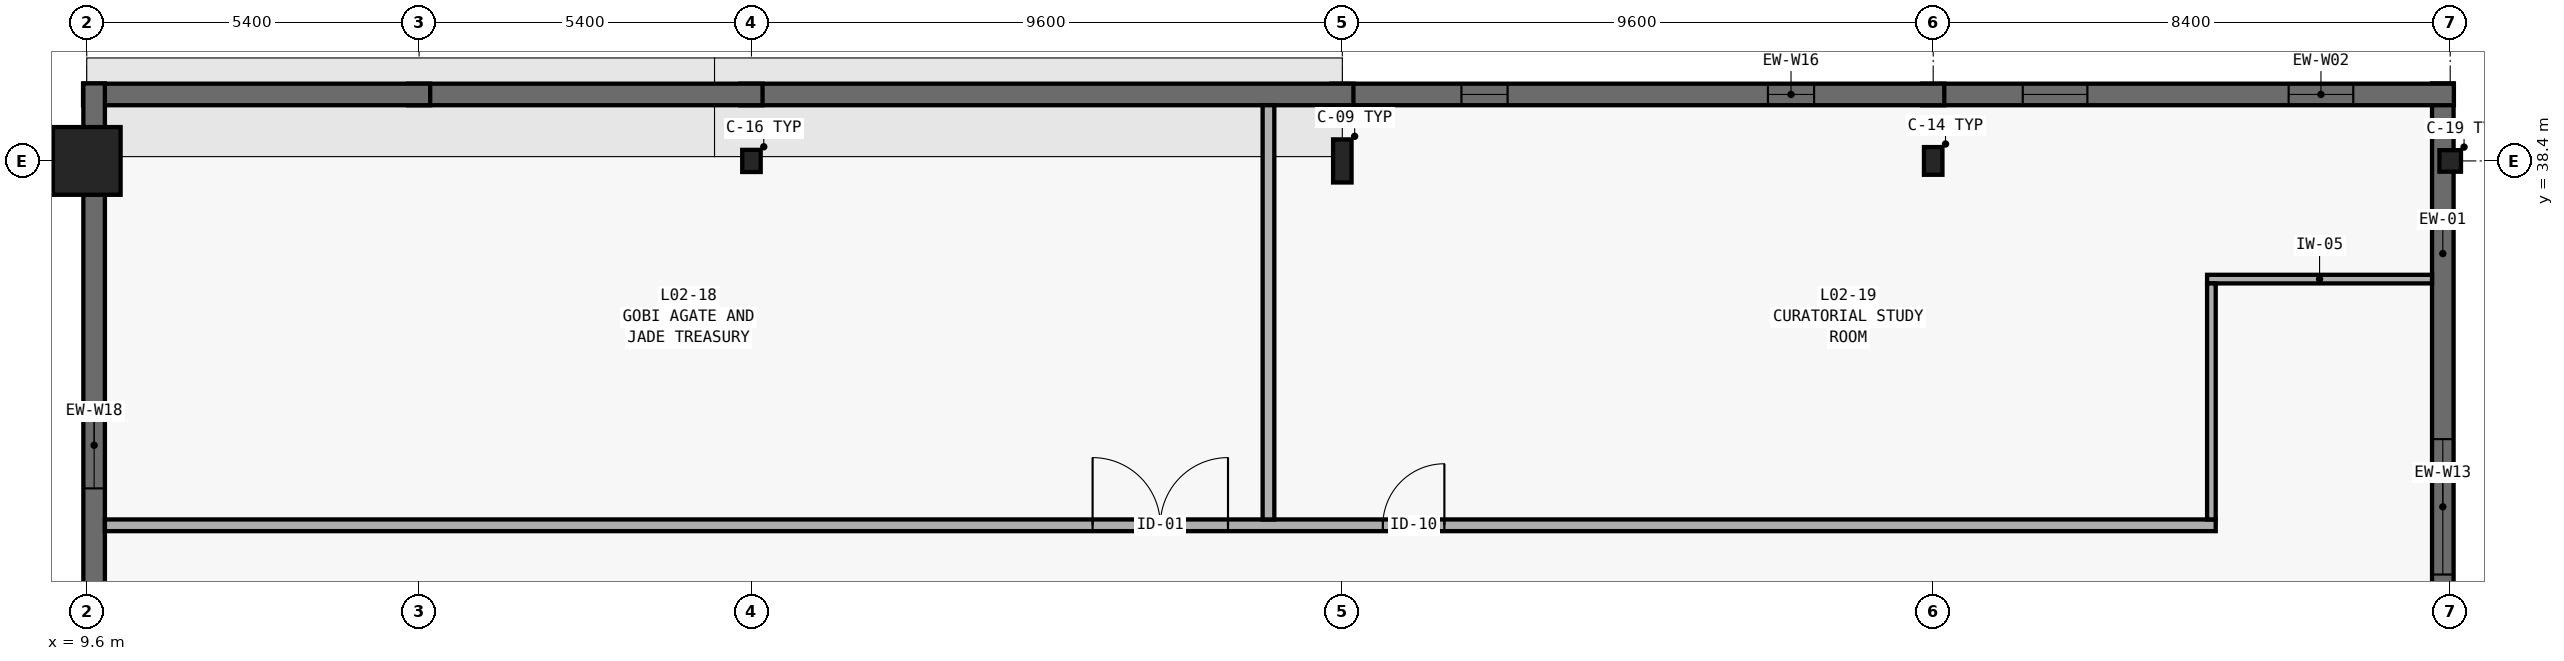
"""IFC4 building model, lengths in metres.
Left out: names, types, materials, properties, quantities, classifications, styles, units other than length and angle.
Written with IfcOpenShell. Run it as: python <this file> out.ifc"""

import sys

from ifc_helpers import new_model, si_unit, direction, frame, frame_2d, origin, origin_2d, place, context, subcontext, project, spatial, rectangle, hollow_rectangle, i_section, extrude, element, fill, save


model = new_model("IFC4")
c1 = context("Model", 3, precision=1e-05, world=origin(), true_north=direction((0.0, 1.0)))
c2 = subcontext(c1, "Body", "Model", "MODEL_VIEW")
j1 = project(units=[si_unit("LENGTHUNIT", "METRE"), si_unit("PLANEANGLEUNIT", "RADIAN")], contexts=[c1])
p1 = place(None, origin())
s1 = spatial("IfcSite", under=j1, at=p1, CompositionType="ELEMENT")
p2 = place(p1, origin())
s2 = spatial("IfcBuilding", under=s1, at=p2, CompositionType="ELEMENT")
p3 = place(p2, frame((0.0, 0.0, 9.0)))
s3 = spatial("IfcBuildingStorey", under=s2, at=p3, CompositionType="ELEMENT", Elevation=9.0)
p4 = place(p3, frame((9.6, 38.4, 0.0), z_axis=(0.0, 0.0, 1.0), x_axis=(1.0, 0.0, 0.0)))
e1 = element("IfcColumn", 1, at=p4, inside=s3, PredefinedType="COLUMN", context=c2, shape_type="SweptSolid", body=[
    extrude(rectangle(XDim=1.1, YDim=1.1, at=origin_2d()), origin(), (0.0, 0.0, 1.0), 8.1),
])
p5 = place(p3, frame((20.4, 38.4, 0.0), z_axis=(0.0, 0.0, 1.0), x_axis=(1.0, 0.0, 0.0)))
e2 = element("IfcColumn", 2, at=p5, inside=s3, PredefinedType="COLUMN", context=c2, shape_type="SweptSolid", body=[
    extrude(i_section(OverallWidth=0.3, OverallDepth=0.36, WebThickness=0.012, FlangeThickness=0.022, FilletRadius=0.027, at=origin_2d()), origin(), (0.0, 0.0, 1.0), 8.1),
])
p6 = place(p3, frame((30.0, 38.4, 0.0), z_axis=(0.0, 0.0, 1.0), x_axis=(1.0, 0.0, 0.0)))
e3 = element("IfcColumn", 3, at=p6, inside=s3, PredefinedType="COLUMN", context=c2, shape_type="SweptSolid", body=[
    extrude(i_section(OverallWidth=0.3, OverallDepth=0.7, WebThickness=0.017, FlangeThickness=0.032, FilletRadius=0.027, at=origin_2d()), origin(), (0.0, 0.0, 1.0), 8.1),
])
p7 = place(p3, frame((39.6, 38.4, 0.0), z_axis=(0.0, 0.0, 1.0), x_axis=(1.0, 0.0, 0.0)))
e4 = element("IfcColumn", 4, at=p7, inside=s3, PredefinedType="COLUMN", context=c2, shape_type="SweptSolid", body=[
    extrude(i_section(OverallWidth=0.3, OverallDepth=0.45, WebThickness=0.014, FlangeThickness=0.026, FilletRadius=0.027, at=origin_2d()), origin(), (0.0, 0.0, 1.0), 8.1),
])
p8 = place(p3, frame((48.0, 38.4, 0.0), z_axis=(0.0, 0.0, 1.0), x_axis=(1.0, 0.0, 0.0)))
e5 = element("IfcColumn", 5, at=p8, inside=s3, PredefinedType="COLUMN", context=c2, shape_type="SweptSolid", body=[
    extrude(hollow_rectangle(XDim=0.35, YDim=0.35, WallThickness=0.016, at=origin_2d()), origin(), (0.0, 0.0, 1.0), 8.1),
])
p9 = place(p3, frame((47.88, 29.82, 0.0), z_axis=(0.0, 0.0, 1.0), x_axis=(0.0, 1.0, 0.0)))
e6 = element("IfcWall", 6, at=p9, inside=s3, PredefinedType="STANDARD", context=c2, shape_type="SweptSolid", body=[
    extrude(rectangle(XDim=9.84, YDim=0.35, at=frame_2d((4.92, 0.0))), origin(), (0.0, 0.0, 1.0), 7.8),
])
p10 = place(p9, frame((1.86, 0.0, 0.9)))
e7 = element("IfcOpeningElement", 7, at=p10, cuts=e6, PredefinedType="OPENING", context=c2, shape_type="SweptSolid", body=[
    extrude(rectangle(XDim=2.2, YDim=1.1, at=frame_2d((1.1, 0.55))), frame((0.0, 0.19, 0.0), z_axis=(0.0, -1.0, 0.0), x_axis=(1.0, 0.0, 0.0)), (0.0, 0.0, 1.0), 0.38),
])
p11 = place(p3, frame((48.06, 39.48, 0.0), z_axis=(0.0, 0.0, 1.0), x_axis=(-1.0, 0.0, 0.0)))
e8 = element("IfcWall", 8, at=p11, inside=s3, PredefinedType="STANDARD", context=c2, shape_type="SweptSolid", body=[
    extrude(rectangle(XDim=8.64, YDim=0.35, at=frame_2d((4.32, 0.0))), origin(), (0.0, 0.0, 1.0), 7.8),
])
p12 = place(p11, frame((1.635, 0.0, 0.9)))
e9 = element("IfcOpeningElement", 9, at=p12, cuts=e8, PredefinedType="OPENING", context=c2, shape_type="SweptSolid", body=[
    extrude(rectangle(XDim=1.05, YDim=2.4, at=frame_2d((0.525, 1.2))), frame((0.0, 0.19, 0.0), z_axis=(0.0, -1.0, 0.0), x_axis=(1.0, 0.0, 0.0)), (0.0, 0.0, 1.0), 0.38),
])
p13 = place(p11, frame((5.955, 0.0, 0.9)))
e10 = element("IfcOpeningElement", 10, at=p13, cuts=e8, PredefinedType="OPENING", context=c2, shape_type="SweptSolid", body=[
    extrude(rectangle(XDim=1.05, YDim=2.4, at=frame_2d((0.525, 1.2))), frame((0.0, 0.19, 0.0), z_axis=(0.0, -1.0, 0.0), x_axis=(1.0, 0.0, 0.0)), (0.0, 0.0, 1.0), 0.38),
])
p14 = place(p3, frame((39.78, 39.48, 0.0), z_axis=(0.0, 0.0, 1.0), x_axis=(-1.0, 0.0, 0.0)))
e11 = element("IfcWall", 11, at=p14, inside=s3, PredefinedType="STANDARD", context=c2, shape_type="SweptSolid", body=[
    extrude(rectangle(XDim=9.96, YDim=0.35, at=frame_2d((4.98, 0.0))), origin(), (0.0, 0.0, 1.0), 7.8),
])
p15 = place(p14, frame((2.115, 0.0, 0.9)))
e12 = element("IfcOpeningElement", 12, at=p15, cuts=e11, PredefinedType="OPENING", context=c2, shape_type="SweptSolid", body=[
    extrude(rectangle(XDim=0.75, YDim=2.2, at=frame_2d((0.375, 1.1))), frame((0.0, 0.19, 0.0), z_axis=(0.0, -1.0, 0.0), x_axis=(1.0, 0.0, 0.0)), (0.0, 0.0, 1.0), 0.38),
])
p16 = place(p14, frame((7.095, 0.0, 0.9)))
e13 = element("IfcOpeningElement", 13, at=p16, cuts=e11, PredefinedType="OPENING", context=c2, shape_type="SweptSolid", body=[
    extrude(rectangle(XDim=0.75, YDim=2.2, at=frame_2d((0.375, 1.1))), frame((0.0, 0.19, 0.0), z_axis=(0.0, -1.0, 0.0), x_axis=(1.0, 0.0, 0.0)), (0.0, 0.0, 1.0), 0.38),
])
p17 = place(p3, frame((30.18, 39.48, 0.0), z_axis=(0.0, 0.0, 1.0), x_axis=(-1.0, 0.0, 0.0)))
e14 = element("IfcWall", 14, at=p17, inside=s3, PredefinedType="STANDARD", context=c2, shape_type="SweptSolid", body=[
    extrude(rectangle(XDim=9.96, YDim=0.35, at=frame_2d((4.98, 0.0))), origin(), (0.0, 0.0, 1.0), 7.8),
])
p18 = place(p3, frame((20.58, 39.48, 0.0), z_axis=(0.0, 0.0, 1.0), x_axis=(-1.0, 0.0, 0.0)))
e15 = element("IfcWall", 15, at=p18, inside=s3, PredefinedType="STANDARD", context=c2, shape_type="SweptSolid", body=[
    extrude(rectangle(XDim=5.76, YDim=0.35, at=frame_2d((2.88, 0.0))), origin(), (0.0, 0.0, 1.0), 7.8),
])
p19 = place(p3, frame((15.18, 39.48, 0.0), z_axis=(0.0, 0.0, 1.0), x_axis=(-1.0, 0.0, 0.0)))
e16 = element("IfcWall", 16, at=p19, inside=s3, PredefinedType="STANDARD", context=c2, shape_type="SweptSolid", body=[
    extrude(rectangle(XDim=5.64, YDim=0.35, at=frame_2d((2.82, 0.0))), origin(), (0.0, 0.0, 1.0), 7.8),
])
p20 = place(p3, frame((9.72, 39.66, 0.0), z_axis=(0.0, 0.0, 1.0), x_axis=(0.0, -1.0, 0.0)))
e17 = element("IfcWall", 17, at=p20, inside=s3, PredefinedType="STANDARD", context=c2, shape_type="SweptSolid", body=[
    extrude(rectangle(XDim=9.84, YDim=0.35, at=frame_2d((4.92, 0.0))), origin(), (0.0, 0.0, 1.0), 7.8),
])
p21 = place(p20, frame((5.18, 0.0, 0.9)))
e18 = element("IfcOpeningElement", 18, at=p21, cuts=e17, PredefinedType="OPENING", context=c2, shape_type="SweptSolid", body=[
    extrude(rectangle(XDim=1.4, YDim=1.8, at=frame_2d((0.7, 0.9))), frame((0.0, 0.19, 0.0), z_axis=(0.0, -1.0, 0.0), x_axis=(1.0, 0.0, 0.0)), (0.0, 0.0, 1.0), 0.38),
])
p22 = place(p3, frame((9.895, 32.48, 0.0), z_axis=(0.0, 0.0, 1.0), x_axis=(1.0, 0.0, 0.0)))
e19 = element("IfcWall", 19, at=p22, inside=s3, PredefinedType="PARTITIONING", context=c2, shape_type="SweptSolid", body=[
    extrude(rectangle(XDim=34.295, YDim=0.19, at=frame_2d((17.147, 0.0))), origin(), (0.0, 0.0, 1.0), 6.7),
])
p23 = place(p22, frame((16.048, 0.0, 0.0)))
e20 = element("IfcOpeningElement", 20, at=p23, cuts=e19, PredefinedType="OPENING", context=c2, shape_type="SweptSolid", body=[
    extrude(rectangle(XDim=2.2, YDim=2.45, at=frame_2d((1.1, 1.225))), frame((0.0, 0.11, 0.0), z_axis=(0.0, -1.0, 0.0), x_axis=(1.0, 0.0, 0.0)), (0.0, 0.0, 1.0), 0.22),
])
p24 = place(p22, frame((20.763, 0.0, 0.0)))
e21 = element("IfcOpeningElement", 21, at=p24, cuts=e19, PredefinedType="OPENING", context=c2, shape_type="SweptSolid", body=[
    extrude(rectangle(XDim=1.0, YDim=2.15, at=frame_2d((0.5, 1.075))), frame((0.0, 0.11, 0.0), z_axis=(0.0, -1.0, 0.0), x_axis=(1.0, 0.0, 0.0)), (0.0, 0.0, 1.0), 0.22),
])
p25 = place(p3, frame((44.05, 36.48, 0.0), z_axis=(0.0, 0.0, 1.0), x_axis=(1.0, 0.0, 0.0)))
e22 = element("IfcWall", 22, at=p25, inside=s3, PredefinedType="PARTITIONING", context=c2, shape_type="SweptSolid", body=[
    extrude(rectangle(XDim=3.655, YDim=0.14, at=frame_2d((1.828, 0.0))), origin(), (0.0, 0.0, 1.0), 6.7),
])
p26 = place(p3, frame((28.8, 32.575, 0.0), z_axis=(0.0, 0.0, 1.0), x_axis=(0.0, 1.0, 0.0)))
e23 = element("IfcWall", 23, at=p26, inside=s3, PredefinedType="PARTITIONING", context=c2, shape_type="SweptSolid", body=[
    extrude(rectangle(XDim=6.73, YDim=0.19, at=frame_2d((3.365, 0.0))), origin(), (0.0, 0.0, 1.0), 6.7),
])
p27 = place(p3, frame((44.12, 32.575, 0.0), z_axis=(0.0, 0.0, 1.0), x_axis=(0.0, 1.0, 0.0)))
e24 = element("IfcWall", 24, at=p27, inside=s3, PredefinedType="PARTITIONING", context=c2, shape_type="SweptSolid", body=[
    extrude(rectangle(XDim=3.835, YDim=0.14, at=frame_2d((1.917, 0.0))), origin(), (0.0, 0.0, 1.0), 6.7),
])
p28 = place(p10, origin())
e25 = element("IfcWindow", 25, at=p28, inside=s3, PartitioningType="SINGLE_PANEL", PredefinedType="WINDOW", context=c2, shape_type="SweptSolid", body=[
    extrude(rectangle(XDim=2.2, YDim=1.1, at=frame_2d((1.1, 0.55))), frame((0.0, 0.03, 0.0), z_axis=(0.0, -1.0, 0.0), x_axis=(1.0, 0.0, 0.0)), (0.0, 0.0, 1.0), 0.06),
])
fill(e7, e25)
p29 = place(p12, origin())
e26 = element("IfcWindow", 26, at=p29, inside=s3, PartitioningType="SINGLE_PANEL", PredefinedType="WINDOW", context=c2, shape_type="SweptSolid", body=[
    extrude(rectangle(XDim=1.05, YDim=2.4, at=frame_2d((0.525, 1.2))), frame((0.0, 0.03, 0.0), z_axis=(0.0, -1.0, 0.0), x_axis=(1.0, 0.0, 0.0)), (0.0, 0.0, 1.0), 0.06),
])
fill(e9, e26)
p30 = place(p13, origin())
e27 = element("IfcWindow", 27, at=p30, inside=s3, PartitioningType="SINGLE_PANEL", PredefinedType="WINDOW", context=c2, shape_type="SweptSolid", body=[
    extrude(rectangle(XDim=1.05, YDim=2.4, at=frame_2d((0.525, 1.2))), frame((0.0, 0.03, 0.0), z_axis=(0.0, -1.0, 0.0), x_axis=(1.0, 0.0, 0.0)), (0.0, 0.0, 1.0), 0.06),
])
fill(e10, e27)
p31 = place(p15, origin())
e28 = element("IfcWindow", 28, at=p31, inside=s3, PartitioningType="SINGLE_PANEL", PredefinedType="WINDOW", context=c2, shape_type="SweptSolid", body=[
    extrude(rectangle(XDim=0.75, YDim=2.2, at=frame_2d((0.375, 1.1))), frame((0.0, 0.03, 0.0), z_axis=(0.0, -1.0, 0.0), x_axis=(1.0, 0.0, 0.0)), (0.0, 0.0, 1.0), 0.06),
])
fill(e12, e28)
p32 = place(p16, origin())
e29 = element("IfcWindow", 29, at=p32, inside=s3, PartitioningType="SINGLE_PANEL", PredefinedType="WINDOW", context=c2, shape_type="SweptSolid", body=[
    extrude(rectangle(XDim=0.75, YDim=2.2, at=frame_2d((0.375, 1.1))), frame((0.0, 0.03, 0.0), z_axis=(0.0, -1.0, 0.0), x_axis=(1.0, 0.0, 0.0)), (0.0, 0.0, 1.0), 0.06),
])
fill(e13, e29)
p33 = place(p21, origin())
e30 = element("IfcWindow", 30, at=p33, inside=s3, PartitioningType="SINGLE_PANEL", PredefinedType="WINDOW", context=c2, shape_type="SweptSolid", body=[
    extrude(rectangle(XDim=1.4, YDim=1.8, at=frame_2d((0.7, 0.9))), frame((0.0, 0.03, 0.0), z_axis=(0.0, -1.0, 0.0), x_axis=(1.0, 0.0, 0.0)), (0.0, 0.0, 1.0), 0.06),
])
fill(e18, e30)
p34 = place(p23, origin())
e31 = element("IfcDoor", 31, at=p34, inside=s3, OperationType="DOUBLE_DOOR_SINGLE_SWING", PredefinedType="DOOR", context=c2, shape_type="SweptSolid", body=[
    extrude(rectangle(XDim=2.2, YDim=2.45, at=frame_2d((1.1, 1.225))), frame((0.0, 0.025, 0.0), z_axis=(0.0, -1.0, 0.0), x_axis=(1.0, 0.0, 0.0)), (0.0, 0.0, 1.0), 0.05),
])
fill(e20, e31)
p35 = place(p24, origin())
e32 = element("IfcDoor", 32, at=p35, inside=s3, OperationType="SINGLE_SWING_RIGHT", PredefinedType="DOOR", context=c2, shape_type="SweptSolid", body=[
    extrude(rectangle(XDim=1.0, YDim=2.15, at=frame_2d((0.5, 1.075))), frame((0.0, 0.025, 0.0), z_axis=(0.0, -1.0, 0.0), x_axis=(1.0, 0.0, 0.0)), (0.0, 0.0, 1.0), 0.05),
])
fill(e21, e32)
save(model, sys.argv[1])
